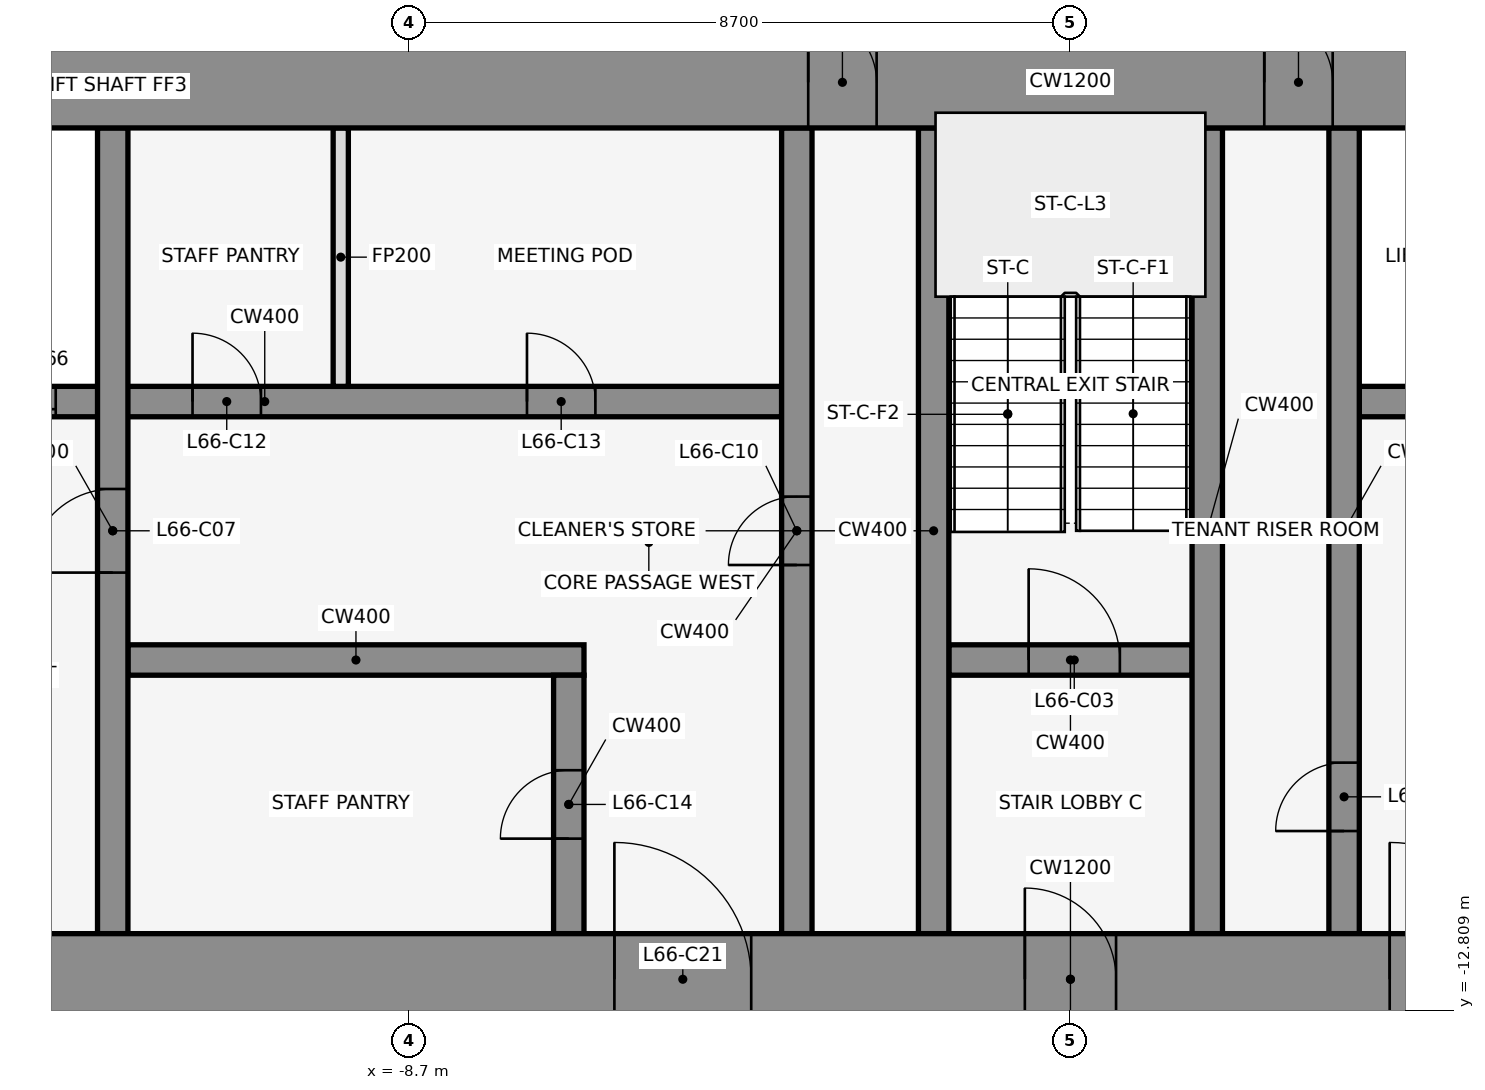
"""IFC4 building model, lengths in metres.
Left out: names, types, materials, properties, quantities, classifications, styles, units other than length and angle.
Written with IfcOpenShell. Run it as: python <this file> out.ifc"""

import sys

from ifc_helpers import new_model, si_unit, direction, frame, frame_2d, origin, place, context, subcontext, project, spatial, rectangle, extrude, element, fill, save


model = new_model("IFC4")
c1 = context("Model", 3, precision=1e-05, world=origin(), true_north=direction((0.0, 1.0)))
c2 = subcontext(c1, "Body", "Model", "MODEL_VIEW")
j1 = project(units=[si_unit("LENGTHUNIT", "METRE"), si_unit("PLANEANGLEUNIT", "RADIAN")], contexts=[c1])
p1 = place(None, origin())
s1 = spatial("IfcSite", under=j1, at=p1, CompositionType="ELEMENT")
p2 = place(p1, origin())
s2 = spatial("IfcBuilding", under=s1, at=p2, CompositionType="ELEMENT")
p3 = place(p2, frame((0.0, 0.0, 293.0)))
s3 = spatial("IfcBuildingStorey", under=s2, at=p3, CompositionType="ELEMENT", Elevation=293.0)
for number, where, z_axis, x_axis in (
    (1, (1.901, 1.08, 0.0), (0.0, 0.0, 1.0), (-0.84, -0.543, 0.0)),
    (2, (-0.068, -0.105, 0.0), (0.0, 0.0, 1.0), (-0.84, 0.543, 0.0)),
):
    element("IfcWall", number, at=place(p3, frame(where, z_axis=z_axis, x_axis=x_axis)), inside=s3, PredefinedType="STANDARD", context=c2, shape_type="SweptSolid", body=[
        extrude(rectangle(XDim=2.183, YDim=0.25, at=frame_2d((1.091, 0.0))), origin(), (0.0, 0.0, 1.0), 4.35),
    ])
p4 = place(p3, frame((-12.4, -8.2, 0.0), z_axis=(0.0, 0.0, 1.0), x_axis=(1.0, 0.0, 0.0)))
e3 = element("IfcWall", 3, at=p4, inside=s3, PredefinedType="SHEAR", context=c2, shape_type="SweptSolid", body=[
    extrude(rectangle(XDim=6.0, YDim=0.4, at=frame_2d((3.0, 0.0))), origin(), (0.0, 0.0, 1.0), 4.5),
])
p5 = place(p3, frame((-1.6, -8.2, 0.0), z_axis=(0.0, 0.0, 1.0), x_axis=(1.0, 0.0, 0.0)))
e4 = element("IfcWall", 4, at=p5, inside=s3, PredefinedType="SHEAR", context=c2, shape_type="SweptSolid", body=[
    extrude(rectangle(XDim=3.2, YDim=0.4, at=frame_2d((1.6, 0.0))), origin(), (0.0, 0.0, 1.0), 4.5),
])
p6 = place(p5, frame((1.05, 0.0, 0.0)))
e5 = element("IfcOpeningElement", 5, at=p6, cuts=e4, PredefinedType="OPENING", context=c2, shape_type="SweptSolid", body=[
    extrude(rectangle(XDim=1.2, YDim=2.1, at=frame_2d((0.6, 1.05))), frame((0.0, 0.212, 0.0), z_axis=(0.0, -1.0, 0.0), x_axis=(1.0, 0.0, 0.0)), (0.0, 0.0, 1.0), 0.424),
])
p7 = place(p3, frame((-17.4, -4.8, 0.0), z_axis=(0.0, 0.0, 1.0), x_axis=(1.0, 0.0, 0.0)))
e6 = element("IfcWall", 6, at=p7, inside=s3, PredefinedType="SHEAR", context=c2, shape_type="SweptSolid", body=[
    extrude(rectangle(XDim=13.6, YDim=0.4, at=frame_2d((6.8, 0.0))), origin(), (0.0, 0.0, 1.0), 4.5),
])
p8 = place(p7, frame((0.65, 0.0, 0.0)))
e7 = element("IfcOpeningElement", 7, at=p8, cuts=e6, PredefinedType="OPENING", context=c2, shape_type="SweptSolid", body=[
    extrude(rectangle(XDim=1.1, YDim=2.1, at=frame_2d((0.55, 1.05))), frame((0.0, 0.212, 0.0), z_axis=(0.0, -1.0, 0.0), x_axis=(1.0, 0.0, 0.0)), (0.0, 0.0, 1.0), 0.424),
])
p9 = place(p7, frame((2.95, 0.0, 0.0)))
e8 = element("IfcOpeningElement", 8, at=p9, cuts=e6, PredefinedType="OPENING", context=c2, shape_type="SweptSolid", body=[
    extrude(rectangle(XDim=1.1, YDim=2.1, at=frame_2d((0.55, 1.05))), frame((0.0, 0.212, 0.0), z_axis=(0.0, -1.0, 0.0), x_axis=(1.0, 0.0, 0.0)), (0.0, 0.0, 1.0), 0.424),
])
p10 = place(p7, frame((5.85, 0.0, 0.0)))
e9 = element("IfcOpeningElement", 9, at=p10, cuts=e6, PredefinedType="OPENING", context=c2, shape_type="SweptSolid", body=[
    extrude(rectangle(XDim=0.9, YDim=2.1, at=frame_2d((0.45, 1.05))), frame((0.0, 0.212, 0.0), z_axis=(0.0, -1.0, 0.0), x_axis=(1.0, 0.0, 0.0)), (0.0, 0.0, 1.0), 0.424),
])
p11 = place(p7, frame((10.25, 0.0, 0.0)))
e10 = element("IfcOpeningElement", 10, at=p11, cuts=e6, PredefinedType="OPENING", context=c2, shape_type="SweptSolid", body=[
    extrude(rectangle(XDim=0.9, YDim=2.1, at=frame_2d((0.45, 1.05))), frame((0.0, 0.212, 0.0), z_axis=(0.0, -1.0, 0.0), x_axis=(1.0, 0.0, 0.0)), (0.0, 0.0, 1.0), 0.424),
])
p12 = place(p3, frame((3.8, -4.8, 0.0), z_axis=(0.0, 0.0, 1.0), x_axis=(1.0, 0.0, 0.0)))
e11 = element("IfcWall", 11, at=p12, inside=s3, PredefinedType="SHEAR", context=c2, shape_type="SweptSolid", body=[
    extrude(rectangle(XDim=13.6, YDim=0.4, at=frame_2d((6.8, 0.0))), origin(), (0.0, 0.0, 1.0), 4.5),
])
p13 = place(p12, frame((0.75, 0.0, 0.0)))
e12 = element("IfcOpeningElement", 12, at=p13, cuts=e11, PredefinedType="OPENING", context=c2, shape_type="SweptSolid", body=[
    extrude(rectangle(XDim=1.2, YDim=2.1, at=frame_2d((0.6, 1.05))), frame((0.0, 0.212, 0.0), z_axis=(0.0, -1.0, 0.0), x_axis=(1.0, 0.0, 0.0)), (0.0, 0.0, 1.0), 0.424),
])
p14 = place(p12, frame((3.65, 0.0, 0.0)))
e13 = element("IfcOpeningElement", 13, at=p14, cuts=e11, PredefinedType="OPENING", context=c2, shape_type="SweptSolid", body=[
    extrude(rectangle(XDim=1.2, YDim=2.1, at=frame_2d((0.6, 1.05))), frame((0.0, 0.212, 0.0), z_axis=(0.0, -1.0, 0.0), x_axis=(1.0, 0.0, 0.0)), (0.0, 0.0, 1.0), 0.424),
])
p15 = place(p12, frame((6.65, 0.0, 0.0)))
e14 = element("IfcOpeningElement", 14, at=p15, cuts=e11, PredefinedType="OPENING", context=c2, shape_type="SweptSolid", body=[
    extrude(rectangle(XDim=1.2, YDim=2.1, at=frame_2d((0.6, 1.05))), frame((0.0, 0.212, 0.0), z_axis=(0.0, -1.0, 0.0), x_axis=(1.0, 0.0, 0.0)), (0.0, 0.0, 1.0), 0.424),
])
p16 = place(p12, frame((9.45, 0.0, 0.0)))
e15 = element("IfcOpeningElement", 15, at=p16, cuts=e11, PredefinedType="OPENING", context=c2, shape_type="SweptSolid", body=[
    extrude(rectangle(XDim=1.1, YDim=2.1, at=frame_2d((0.55, 1.05))), frame((0.0, 0.212, 0.0), z_axis=(0.0, -1.0, 0.0), x_axis=(1.0, 0.0, 0.0)), (0.0, 0.0, 1.0), 0.424),
])
p17 = place(p12, frame((11.85, 0.0, 0.0)))
e16 = element("IfcOpeningElement", 16, at=p17, cuts=e11, PredefinedType="OPENING", context=c2, shape_type="SweptSolid", body=[
    extrude(rectangle(XDim=1.1, YDim=2.1, at=frame_2d((0.55, 1.05))), frame((0.0, 0.212, 0.0), z_axis=(0.0, -1.0, 0.0), x_axis=(1.0, 0.0, 0.0)), (0.0, 0.0, 1.0), 0.424),
])
p18 = place(p3, frame((-12.6, -11.8, 0.0), z_axis=(0.0, 0.0, 1.0), x_axis=(0.0, 1.0, 0.0)))
e17 = element("IfcWall", 17, at=p18, inside=s3, PredefinedType="SHEAR", context=c2, shape_type="SweptSolid", body=[
    extrude(rectangle(XDim=10.6, YDim=0.4, at=frame_2d((5.3, 0.0))), origin(), (0.0, 0.0, 1.0), 4.5),
])
p19 = place(p18, frame((4.75, 0.0, 0.0)))
e18 = element("IfcOpeningElement", 18, at=p19, cuts=e17, PredefinedType="OPENING", context=c2, shape_type="SweptSolid", body=[
    extrude(rectangle(XDim=1.1, YDim=2.1, at=frame_2d((0.55, 1.05))), frame((0.0, 0.212, 0.0), z_axis=(0.0, -1.0, 0.0), x_axis=(1.0, 0.0, 0.0)), (0.0, 0.0, 1.0), 0.424),
])
p20 = place(p3, frame((-9.6, -4.6, 0.0), z_axis=(0.0, 0.0, 1.0), x_axis=(0.0, 1.0, 0.0)))
e19 = element("IfcWall", 19, at=p20, inside=s3, PredefinedType="PARTITIONING", context=c2, shape_type="SweptSolid", body=[
    extrude(rectangle(XDim=3.4, YDim=0.2, at=frame_2d((1.7, 0.0))), origin(), (0.0, 0.0, 1.0), 3.418),
])
p21 = place(p3, frame((-6.6, -11.8, 0.0), z_axis=(0.0, 0.0, 1.0), x_axis=(0.0, 1.0, 0.0)))
e20 = element("IfcWall", 20, at=p21, inside=s3, PredefinedType="SHEAR", context=c2, shape_type="SweptSolid", body=[
    extrude(rectangle(XDim=3.4, YDim=0.4, at=frame_2d((1.7, 0.0))), origin(), (0.0, 0.0, 1.0), 4.5),
])
p22 = place(p21, frame((1.25, 0.0, 0.0)))
e21 = element("IfcOpeningElement", 21, at=p22, cuts=e20, PredefinedType="OPENING", context=c2, shape_type="SweptSolid", body=[
    extrude(rectangle(XDim=0.9, YDim=2.1, at=frame_2d((0.45, 1.05))), frame((0.0, 0.212, 0.0), z_axis=(0.0, -1.0, 0.0), x_axis=(1.0, 0.0, 0.0)), (0.0, 0.0, 1.0), 0.424),
])
p23 = place(p3, frame((-3.6, -11.8, 0.0), z_axis=(0.0, 0.0, 1.0), x_axis=(0.0, 1.0, 0.0)))
e22 = element("IfcWall", 22, at=p23, inside=s3, PredefinedType="SHEAR", context=c2, shape_type="SweptSolid", body=[
    extrude(rectangle(XDim=10.6, YDim=0.4, at=frame_2d((5.3, 0.0))), origin(), (0.0, 0.0, 1.0), 4.5),
])
p24 = place(p23, frame((4.85, 0.0, 0.0)))
e23 = element("IfcOpeningElement", 23, at=p24, cuts=e22, PredefinedType="OPENING", context=c2, shape_type="SweptSolid", body=[
    extrude(rectangle(XDim=0.9, YDim=2.1, at=frame_2d((0.45, 1.05))), frame((0.0, 0.212, 0.0), z_axis=(0.0, -1.0, 0.0), x_axis=(1.0, 0.0, 0.0)), (0.0, 0.0, 1.0), 0.424),
])
for number, where, z_axis, x_axis in (
    (24, (-1.8, -11.8, 0.0), (0.0, 0.0, 1.0), (0.0, 1.0, 0.0)),
    (25, (1.8, -11.8, 0.0), (0.0, 0.0, 1.0), (0.0, 1.0, 0.0)),
):
    element("IfcWall", number, at=place(p3, frame(where, z_axis=z_axis, x_axis=x_axis)), inside=s3, PredefinedType="SHEAR", context=c2, shape_type="SweptSolid", body=[
        extrude(rectangle(XDim=10.6, YDim=0.4, at=frame_2d((5.3, 0.0))), origin(), (0.0, 0.0, 1.0), 4.5),
    ])
p25 = place(p3, frame((3.6, -11.8, 0.0), z_axis=(0.0, 0.0, 1.0), x_axis=(0.0, 1.0, 0.0)))
e26 = element("IfcWall", 26, at=p25, inside=s3, PredefinedType="SHEAR", context=c2, shape_type="SweptSolid", body=[
    extrude(rectangle(XDim=10.6, YDim=0.4, at=frame_2d((5.3, 0.0))), origin(), (0.0, 0.0, 1.0), 4.5),
])
p26 = place(p25, frame((1.35, 0.0, 0.0)))
e27 = element("IfcOpeningElement", 27, at=p26, cuts=e26, PredefinedType="OPENING", context=c2, shape_type="SweptSolid", body=[
    extrude(rectangle(XDim=0.9, YDim=2.1, at=frame_2d((0.45, 1.05))), frame((0.0, 0.212, 0.0), z_axis=(0.0, -1.0, 0.0), x_axis=(1.0, 0.0, 0.0)), (0.0, 0.0, 1.0), 0.424),
])
p27 = place(p3, frame((-22.0, -0.6, 0.0), z_axis=(0.0, 0.0, 1.0), x_axis=(1.0, 0.0, 0.0)))
e28 = element("IfcWall", 28, at=p27, inside=s3, PredefinedType="SHEAR", context=c2, shape_type="SweptSolid", body=[
    extrude(rectangle(XDim=44.0, YDim=1.2, at=frame_2d((22.0, 0.0))), origin(), (0.0, 0.0, 1.0), 4.5),
])
p28 = place(p27, frame((18.55, 0.0, 0.0)))
e29 = element("IfcOpeningElement", 29, at=p28, cuts=e28, PredefinedType="OPENING", context=c2, shape_type="SweptSolid", body=[
    extrude(rectangle(XDim=0.9, YDim=2.1, at=frame_2d((0.45, 1.05))), frame((0.0, 0.612, 0.0), z_axis=(0.0, -1.0, 0.0), x_axis=(1.0, 0.0, 0.0)), (0.0, 0.0, 1.0), 1.224),
])
p29 = place(p27, frame((24.55, 0.0, 0.0)))
e30 = element("IfcOpeningElement", 30, at=p29, cuts=e28, PredefinedType="OPENING", context=c2, shape_type="SweptSolid", body=[
    extrude(rectangle(XDim=0.9, YDim=2.1, at=frame_2d((0.45, 1.05))), frame((0.0, 0.612, 0.0), z_axis=(0.0, -1.0, 0.0), x_axis=(1.0, 0.0, 0.0)), (0.0, 0.0, 1.0), 1.224),
])
p30 = place(p3, frame((-22.0, -12.4, 0.0), z_axis=(0.0, 0.0, 1.0), x_axis=(1.0, 0.0, 0.0)))
e31 = element("IfcWall", 31, at=p30, inside=s3, PredefinedType="SHEAR", context=c2, shape_type="SweptSolid", body=[
    extrude(rectangle(XDim=44.0, YDim=1.2, at=frame_2d((22.0, 0.0))), origin(), (0.0, 0.0, 1.0), 4.5),
])
p31 = place(p30, frame((2.2, 0.0, 0.0)))
e32 = element("IfcOpeningElement", 32, at=p31, cuts=e31, PredefinedType="OPENING", context=c2, shape_type="SweptSolid", body=[
    extrude(rectangle(XDim=1.2, YDim=2.1, at=frame_2d((0.6, 1.05))), frame((0.0, 0.612, 0.0), z_axis=(0.0, -1.0, 0.0), x_axis=(1.0, 0.0, 0.0)), (0.0, 0.0, 1.0), 1.224),
])
p32 = place(p30, frame((21.4, 0.0, 0.0)))
e33 = element("IfcOpeningElement", 33, at=p32, cuts=e31, PredefinedType="OPENING", context=c2, shape_type="SweptSolid", body=[
    extrude(rectangle(XDim=1.2, YDim=2.1, at=frame_2d((0.6, 1.05))), frame((0.0, 0.612, 0.0), z_axis=(0.0, -1.0, 0.0), x_axis=(1.0, 0.0, 0.0)), (0.0, 0.0, 1.0), 1.224),
])
p33 = place(p30, frame((40.6, 0.0, 0.0)))
e34 = element("IfcOpeningElement", 34, at=p33, cuts=e31, PredefinedType="OPENING", context=c2, shape_type="SweptSolid", body=[
    extrude(rectangle(XDim=1.2, YDim=2.1, at=frame_2d((0.6, 1.05))), frame((0.0, 0.612, 0.0), z_axis=(0.0, -1.0, 0.0), x_axis=(1.0, 0.0, 0.0)), (0.0, 0.0, 1.0), 1.224),
])
p34 = place(p30, frame((16.0, 0.0, 0.0)))
e35 = element("IfcOpeningElement", 35, at=p34, cuts=e31, PredefinedType="OPENING", context=c2, shape_type="SweptSolid", body=[
    extrude(rectangle(XDim=1.8, YDim=2.1, at=frame_2d((0.9, 1.05))), frame((0.0, 0.612, 0.0), z_axis=(0.0, -1.0, 0.0), x_axis=(1.0, 0.0, 0.0)), (0.0, 0.0, 1.0), 1.224),
])
p35 = place(p30, frame((6.3, 0.0, 0.0)))
e36 = element("IfcOpeningElement", 36, at=p35, cuts=e31, PredefinedType="OPENING", context=c2, shape_type="SweptSolid", body=[
    extrude(rectangle(XDim=1.2, YDim=2.1, at=frame_2d((0.6, 1.05))), frame((0.0, 0.612, 0.0), z_axis=(0.0, -1.0, 0.0), x_axis=(1.0, 0.0, 0.0)), (0.0, 0.0, 1.0), 1.224),
])
p36 = place(p30, frame((26.2, 0.0, 0.0)))
e37 = element("IfcOpeningElement", 37, at=p36, cuts=e31, PredefinedType="OPENING", context=c2, shape_type="SweptSolid", body=[
    extrude(rectangle(XDim=1.8, YDim=2.1, at=frame_2d((0.9, 1.05))), frame((0.0, 0.612, 0.0), z_axis=(0.0, -1.0, 0.0), x_axis=(1.0, 0.0, 0.0)), (0.0, 0.0, 1.0), 1.224),
])
p37 = place(p30, frame((36.5, 0.0, 0.0)))
e38 = element("IfcOpeningElement", 38, at=p37, cuts=e31, PredefinedType="OPENING", context=c2, shape_type="SweptSolid", body=[
    extrude(rectangle(XDim=1.2, YDim=2.1, at=frame_2d((0.6, 1.05))), frame((0.0, 0.612, 0.0), z_axis=(0.0, -1.0, 0.0), x_axis=(1.0, 0.0, 0.0)), (0.0, 0.0, 1.0), 1.224),
])
p38 = place(p6, origin())
e39 = element("IfcDoor", 39, at=p38, inside=s3, OperationType="SINGLE_SWING_LEFT", PredefinedType="DOOR", context=c2, shape_type="SweptSolid", body=[
    extrude(rectangle(XDim=1.2, YDim=2.1, at=frame_2d((0.6, 1.05))), frame((0.0, 0.025, 0.0), z_axis=(0.0, -1.0, 0.0), x_axis=(1.0, 0.0, 0.0)), (0.0, 0.0, 1.0), 0.05),
])
fill(e5, e39)
p39 = place(p9, origin())
e40 = element("IfcDoor", 40, at=p39, inside=s3, OperationType="DOUBLE_DOOR_SLIDING", PredefinedType="DOOR", context=c2, shape_type="SweptSolid", body=[
    extrude(rectangle(XDim=1.1, YDim=2.1, at=frame_2d((0.55, 1.05))), frame((0.0, 0.025, 0.0), z_axis=(0.0, -1.0, 0.0), x_axis=(1.0, 0.0, 0.0)), (0.0, 0.0, 1.0), 0.05),
])
fill(e8, e40)
p40 = place(p19, origin())
e41 = element("IfcDoor", 41, at=p40, inside=s3, OperationType="SINGLE_SWING_LEFT", PredefinedType="DOOR", context=c2, shape_type="SweptSolid", body=[
    extrude(rectangle(XDim=1.1, YDim=2.1, at=frame_2d((0.55, 1.05))), frame((0.0, 0.025, 0.0), z_axis=(0.0, -1.0, 0.0), x_axis=(1.0, 0.0, 0.0)), (0.0, 0.0, 1.0), 0.05),
])
fill(e18, e41)
p41 = place(p24, frame((0.9, 0.0, 0.0), z_axis=(0.0, 0.0, 1.0), x_axis=(-1.0, 0.0, 0.0)))
e42 = element("IfcDoor", 42, at=p41, inside=s3, OperationType="SINGLE_SWING_LEFT", PredefinedType="DOOR", context=c2, shape_type="SweptSolid", body=[
    extrude(rectangle(XDim=0.9, YDim=2.1, at=frame_2d((0.45, 1.05))), frame((0.0, 0.025, 0.0), z_axis=(0.0, -1.0, 0.0), x_axis=(1.0, 0.0, 0.0)), (0.0, 0.0, 1.0), 0.05),
])
fill(e23, e42)
p42 = place(p26, origin())
e43 = element("IfcDoor", 43, at=p42, inside=s3, OperationType="SINGLE_SWING_LEFT", PredefinedType="DOOR", context=c2, shape_type="SweptSolid", body=[
    extrude(rectangle(XDim=0.9, YDim=2.1, at=frame_2d((0.45, 1.05))), frame((0.0, 0.025, 0.0), z_axis=(0.0, -1.0, 0.0), x_axis=(1.0, 0.0, 0.0)), (0.0, 0.0, 1.0), 0.05),
])
fill(e27, e43)
p43 = place(p10, origin())
e44 = element("IfcDoor", 44, at=p43, inside=s3, OperationType="SINGLE_SWING_RIGHT", PredefinedType="DOOR", context=c2, shape_type="SweptSolid", body=[
    extrude(rectangle(XDim=0.9, YDim=2.1, at=frame_2d((0.45, 1.05))), frame((0.0, 0.025, 0.0), z_axis=(0.0, -1.0, 0.0), x_axis=(1.0, 0.0, 0.0)), (0.0, 0.0, 1.0), 0.05),
])
fill(e9, e44)
p44 = place(p11, origin())
e45 = element("IfcDoor", 45, at=p44, inside=s3, OperationType="SINGLE_SWING_LEFT", PredefinedType="DOOR", context=c2, shape_type="SweptSolid", body=[
    extrude(rectangle(XDim=0.9, YDim=2.1, at=frame_2d((0.45, 1.05))), frame((0.0, 0.025, 0.0), z_axis=(0.0, -1.0, 0.0), x_axis=(1.0, 0.0, 0.0)), (0.0, 0.0, 1.0), 0.05),
])
fill(e10, e45)
p45 = place(p22, origin())
e46 = element("IfcDoor", 46, at=p45, inside=s3, OperationType="SINGLE_SWING_RIGHT", PredefinedType="DOOR", context=c2, shape_type="SweptSolid", body=[
    extrude(rectangle(XDim=0.9, YDim=2.1, at=frame_2d((0.45, 1.05))), frame((0.0, 0.025, 0.0), z_axis=(0.0, -1.0, 0.0), x_axis=(1.0, 0.0, 0.0)), (0.0, 0.0, 1.0), 0.05),
])
fill(e21, e46)
p46 = place(p28, origin())
e47 = element("IfcDoor", 47, at=p46, inside=s3, OperationType="SINGLE_SWING_LEFT", PredefinedType="DOOR", context=c2, shape_type="SweptSolid", body=[
    extrude(rectangle(XDim=0.9, YDim=2.1, at=frame_2d((0.45, 1.05))), frame((0.0, 0.025, 0.0), z_axis=(0.0, -1.0, 0.0), x_axis=(1.0, 0.0, 0.0)), (0.0, 0.0, 1.0), 0.05),
])
fill(e29, e47)
p47 = place(p29, origin())
e48 = element("IfcDoor", 48, at=p47, inside=s3, OperationType="SINGLE_SWING_LEFT", PredefinedType="DOOR", context=c2, shape_type="SweptSolid", body=[
    extrude(rectangle(XDim=0.9, YDim=2.1, at=frame_2d((0.45, 1.05))), frame((0.0, 0.025, 0.0), z_axis=(0.0, -1.0, 0.0), x_axis=(1.0, 0.0, 0.0)), (0.0, 0.0, 1.0), 0.05),
])
fill(e30, e48)
p48 = place(p32, frame((1.2, 0.0, 0.0), z_axis=(0.0, 0.0, 1.0), x_axis=(-1.0, 0.0, 0.0)))
e49 = element("IfcDoor", 49, at=p48, inside=s3, OperationType="SINGLE_SWING_RIGHT", PredefinedType="DOOR", context=c2, shape_type="SweptSolid", body=[
    extrude(rectangle(XDim=1.2, YDim=2.1, at=frame_2d((0.6, 1.05))), frame((0.0, 0.025, 0.0), z_axis=(0.0, -1.0, 0.0), x_axis=(1.0, 0.0, 0.0)), (0.0, 0.0, 1.0), 0.05),
])
fill(e33, e49)
p49 = place(p34, origin())
e50 = element("IfcDoor", 50, at=p49, inside=s3, OperationType="SINGLE_SWING_LEFT", PredefinedType="DOOR", context=c2, shape_type="SweptSolid", body=[
    extrude(rectangle(XDim=1.8, YDim=2.1, at=frame_2d((0.9, 1.05))), frame((0.0, 0.025, 0.0), z_axis=(0.0, -1.0, 0.0), x_axis=(1.0, 0.0, 0.0)), (0.0, 0.0, 1.0), 0.05),
])
fill(e35, e50)
p50 = place(p36, origin())
e51 = element("IfcDoor", 51, at=p50, inside=s3, OperationType="SINGLE_SWING_LEFT", PredefinedType="DOOR", context=c2, shape_type="SweptSolid", body=[
    extrude(rectangle(XDim=1.8, YDim=2.1, at=frame_2d((0.9, 1.05))), frame((0.0, 0.025, 0.0), z_axis=(0.0, -1.0, 0.0), x_axis=(1.0, 0.0, 0.0)), (0.0, 0.0, 1.0), 0.05),
])
fill(e37, e51)
save(model, sys.argv[1])
